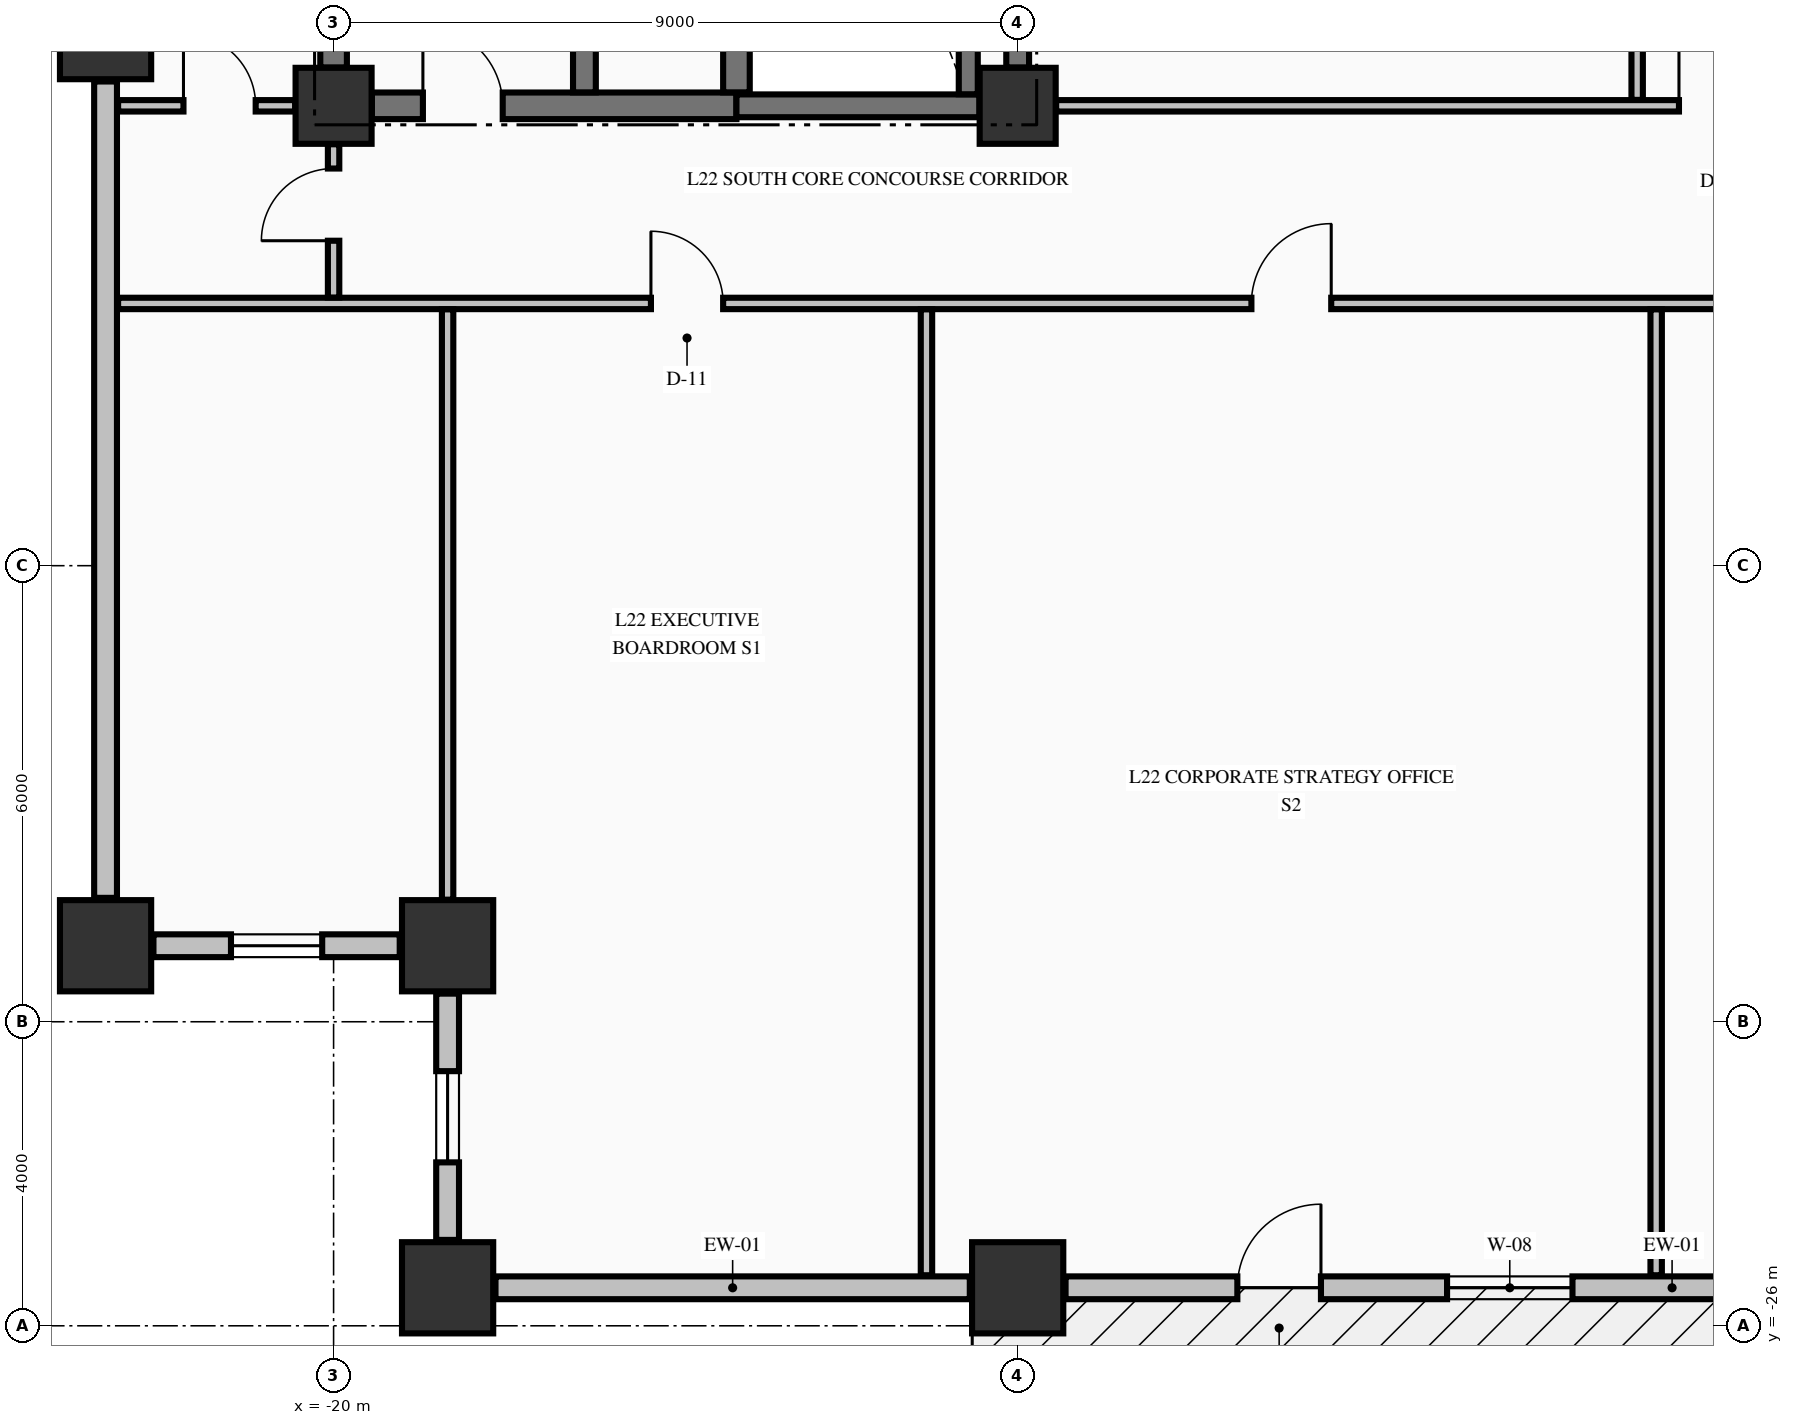
"""IFC4 building model, lengths in metres.
Left out: names, types, materials, properties, quantities, classifications, styles, units other than length and angle.
Written with IfcOpenShell. Run it as: python <this file> out.ifc"""

import sys

from ifc_helpers import new_model, si_unit, direction, frame, frame_2d, origin, origin_2d, place, context, subcontext, project, spatial, rectangle, extrude, element, fill, save


model = new_model("IFC4")
c1 = context("Model", 3, precision=1e-05, world=origin(), true_north=direction((0.0, 1.0)))
c2 = subcontext(c1, "Body", "Model", "MODEL_VIEW")
j1 = project(units=[si_unit("LENGTHUNIT", "METRE"), si_unit("PLANEANGLEUNIT", "RADIAN")], contexts=[c1])
p1 = place(None, origin())
s1 = spatial("IfcSite", under=j1, at=p1, CompositionType="ELEMENT")
p2 = place(p1, origin())
s2 = spatial("IfcBuilding", under=s1, at=p2, CompositionType="ELEMENT")
p3 = place(p2, frame((0.0, 0.0, 91.36)))
s3 = spatial("IfcBuildingStorey", under=s2, at=p3, CompositionType="ELEMENT", Elevation=91.36)
for number, where, z_axis, x_axis in (
    (1, (-18.5, -25.5, -0.25), (0.0, 0.0, 1.0), (1.0, 0.0, 0.0)),
    (2, (-11.0, -25.5, -0.25), (0.0, 0.0, 1.0), (1.0, 0.0, 0.0)),
    (3, (-23.0, -21.0, -0.25), (0.0, 0.0, 1.0), (1.0, 0.0, 0.0)),
    (4, (-23.0, -9.0, -0.25), (0.0, 0.0, 1.0), (1.0, 0.0, 0.0)),
    (5, (-18.5, -21.0, -0.25), (0.0, 0.0, 1.0), (1.0, 0.0, 0.0)),
):
    element("IfcColumn", number, at=place(p3, frame(where, z_axis=z_axis, x_axis=x_axis)), inside=s3, PredefinedType="COLUMN", context=c2, shape_type="SweptSolid", body=[
        extrude(rectangle(XDim=1.2, YDim=1.2, at=origin_2d()), origin(), (0.0, 0.0, 1.0), 3.57),
    ])
for number, where, z_axis, x_axis in (
    (6, (-20.0, -9.95, -0.25), (0.0, 0.0, 1.0), (1.0, 0.0, 0.0)),
    (7, (-11.0, -9.95, -0.25), (0.0, 0.0, 1.0), (1.0, 0.0, 0.0)),
):
    element("IfcColumn", number, at=place(p3, frame(where, z_axis=z_axis, x_axis=x_axis)), inside=s3, PredefinedType="COLUMN", context=c2, shape_type="SweptSolid", body=[
        extrude(rectangle(XDim=1.0, YDim=1.0, at=origin_2d()), origin(), (0.0, 0.0, 1.0), 3.57),
    ])
p4 = place(p3, frame((-22.37, -21.0, 0.0), z_axis=(0.0, 0.0, 1.0), x_axis=(1.0, 0.0, 0.0)))
e8 = element("IfcWall", 8, at=p4, inside=s3, PredefinedType="STANDARD", context=c2, shape_type="SweptSolid", body=[
    extrude(rectangle(XDim=3.24, YDim=0.3, at=frame_2d((1.62, 0.0))), origin(), (0.0, 0.0, 1.0), 2.712),
])
p5 = place(p4, frame((1.02, 0.0, 0.82)))
e9 = element("IfcOpeningElement", 9, at=p5, cuts=e8, PredefinedType="OPENING", context=c2, shape_type="SweptSolid", body=[
    extrude(rectangle(XDim=1.2, YDim=1.65, at=frame_2d((0.6, 0.825))), frame((0.0, 0.16, 0.0), z_axis=(0.0, -1.0, 0.0), x_axis=(1.0, 0.0, 0.0)), (0.0, 0.0, 1.0), 0.32),
])
p6 = place(p3, frame((-18.5, -21.63, 0.0), z_axis=(0.0, 0.0, 1.0), x_axis=(0.0, -1.0, 0.0)))
e10 = element("IfcWall", 10, at=p6, inside=s3, PredefinedType="STANDARD", context=c2, shape_type="SweptSolid", body=[
    extrude(rectangle(XDim=3.24, YDim=0.3, at=frame_2d((1.62, 0.0))), origin(), (0.0, 0.0, 1.0), 2.712),
])
p7 = place(p6, frame((1.02, 0.0, 0.82)))
e11 = element("IfcOpeningElement", 11, at=p7, cuts=e10, PredefinedType="OPENING", context=c2, shape_type="SweptSolid", body=[
    extrude(rectangle(XDim=1.2, YDim=1.65, at=frame_2d((0.6, 0.825))), frame((0.0, 0.16, 0.0), z_axis=(0.0, -1.0, 0.0), x_axis=(1.0, 0.0, 0.0)), (0.0, 0.0, 1.0), 0.32),
])
p8 = place(p3, frame((-17.87, -25.5, 0.0), z_axis=(0.0, 0.0, 1.0), x_axis=(1.0, 0.0, 0.0)))
e12 = element("IfcWall", 12, at=p8, inside=s3, PredefinedType="STANDARD", context=c2, shape_type="SweptSolid", body=[
    extrude(rectangle(XDim=6.24, YDim=0.3, at=frame_2d((3.12, 0.0))), origin(), (0.0, 0.0, 1.0), 2.712),
])
p9 = place(p3, frame((-10.37, -25.5, 0.0), z_axis=(0.0, 0.0, 1.0), x_axis=(1.0, 0.0, 0.0)))
e13 = element("IfcWall", 13, at=p9, inside=s3, PredefinedType="STANDARD", context=c2, shape_type="SweptSolid", body=[
    extrude(rectangle(XDim=9.74, YDim=0.3, at=frame_2d((4.87, 0.0))), origin(), (0.0, 0.0, 1.0), 2.712),
])
p10 = place(p9, frame((2.26, 0.0, 0.0)))
e14 = element("IfcOpeningElement", 14, at=p10, cuts=e13, PredefinedType="OPENING", context=c2, shape_type="SweptSolid", body=[
    extrude(rectangle(XDim=1.1, YDim=2.15, at=frame_2d((0.55, 1.075))), frame((0.0, 0.16, 0.0), z_axis=(0.0, -1.0, 0.0), x_axis=(1.0, 0.0, 0.0)), (0.0, 0.0, 1.0), 0.32),
])
p11 = place(p9, frame((5.019, 0.0, 0.8)))
e15 = element("IfcOpeningElement", 15, at=p11, cuts=e13, PredefinedType="OPENING", context=c2, shape_type="SweptSolid", body=[
    extrude(rectangle(XDim=1.65, YDim=1.7, at=frame_2d((0.825, 0.85))), frame((0.0, 0.16, 0.0), z_axis=(0.0, -1.0, 0.0), x_axis=(1.0, 0.0, 0.0)), (0.0, 0.0, 1.0), 0.32),
])
p12 = place(p3, frame((-23.0, -9.63, 0.0), z_axis=(0.0, 0.0, 1.0), x_axis=(0.0, -1.0, 0.0)))
e16 = element("IfcWall", 16, at=p12, inside=s3, PredefinedType="STANDARD", context=c2, shape_type="SweptSolid", body=[
    extrude(rectangle(XDim=10.74, YDim=0.3, at=frame_2d((5.37, 0.0))), origin(), (0.0, 0.0, 1.0), 2.712),
])
p13 = place(p3, frame((-19.496, -9.95, 0.0), z_axis=(0.0, 0.0, 1.0), x_axis=(1.0, 0.0, 0.0)))
e17 = element("IfcWall", 17, at=p13, inside=s3, PredefinedType="SHEAR", context=c2, shape_type="SweptSolid", body=[
    extrude(rectangle(XDim=4.796, YDim=0.35, at=frame_2d((2.398, 0.0))), origin(), (0.0, 0.0, 1.0), 3.32),
])
p14 = place(p13, frame((0.671, 0.0, 0.0)))
e18 = element("IfcOpeningElement", 18, at=p14, cuts=e17, PredefinedType="OPENING", context=c2, shape_type="SweptSolid", body=[
    extrude(rectangle(XDim=1.05, YDim=2.15, at=frame_2d((0.525, 1.075))), frame((0.0, 0.185, 0.0), z_axis=(0.0, -1.0, 0.0), x_axis=(1.0, 0.0, 0.0)), (0.0, 0.0, 1.0), 0.37),
])
p15 = place(p3, frame((-14.7, -9.95, 0.0), z_axis=(0.0, 0.0, 1.0), x_axis=(1.0, 0.0, 0.0)))
e19 = element("IfcWall", 19, at=p15, inside=s3, PredefinedType="SHEAR", context=c2, shape_type="SweptSolid", body=[
    extrude(rectangle(XDim=3.196, YDim=0.3, at=frame_2d((1.598, 0.0))), origin(), (0.0, 0.0, 1.0), 3.32),
])
p16 = place(p3, frame((-22.835, -12.55, 0.0), z_axis=(0.0, 0.0, 1.0), x_axis=(1.0, 0.0, 0.0)))
e20 = element("IfcWall", 20, at=p16, inside=s3, PredefinedType="PARTITIONING", context=c2, shape_type="SweptSolid", body=[
    extrude(rectangle(XDim=50.67, YDim=0.15, at=frame_2d((25.335, 0.0))), origin(), (0.0, 0.0, 1.0), 3.32),
])
p17 = place(p16, frame((7.01, 0.0, 0.0)))
e21 = element("IfcOpeningElement", 21, at=p17, cuts=e20, PredefinedType="OPENING", context=c2, shape_type="SweptSolid", body=[
    extrude(rectangle(XDim=0.95, YDim=2.15, at=frame_2d((0.475, 1.075))), frame((0.0, 0.085, 0.0), z_axis=(0.0, -1.0, 0.0), x_axis=(1.0, 0.0, 0.0)), (0.0, 0.0, 1.0), 0.17),
])
p18 = place(p16, frame((14.91, 0.0, 0.0)))
e22 = element("IfcOpeningElement", 22, at=p18, cuts=e20, PredefinedType="OPENING", context=c2, shape_type="SweptSolid", body=[
    extrude(rectangle(XDim=1.05, YDim=2.15, at=frame_2d((0.525, 1.075))), frame((0.0, 0.085, 0.0), z_axis=(0.0, -1.0, 0.0), x_axis=(1.0, 0.0, 0.0)), (0.0, 0.0, 1.0), 0.17),
])
p19 = place(p16, frame((24.71, 0.0, 0.0)))
e23 = element("IfcOpeningElement", 23, at=p19, cuts=e20, PredefinedType="OPENING", context=c2, shape_type="SweptSolid", body=[
    extrude(rectangle(XDim=1.05, YDim=2.15, at=frame_2d((0.525, 1.075))), frame((0.0, 0.085, 0.0), z_axis=(0.0, -1.0, 0.0), x_axis=(1.0, 0.0, 0.0)), (0.0, 0.0, 1.0), 0.17),
])
p20 = place(p16, frame((35.91, 0.0, 0.0)))
e24 = element("IfcOpeningElement", 24, at=p20, cuts=e20, PredefinedType="OPENING", context=c2, shape_type="SweptSolid", body=[
    extrude(rectangle(XDim=1.05, YDim=2.15, at=frame_2d((0.525, 1.075))), frame((0.0, 0.085, 0.0), z_axis=(0.0, -1.0, 0.0), x_axis=(1.0, 0.0, 0.0)), (0.0, 0.0, 1.0), 0.17),
])
p21 = place(p3, frame((-22.835, -9.95, 0.0), z_axis=(0.0, 0.0, 1.0), x_axis=(1.0, 0.0, 0.0)))
e25 = element("IfcWall", 25, at=p21, inside=s3, PredefinedType="PARTITIONING", context=c2, shape_type="SweptSolid", body=[
    extrude(rectangle(XDim=2.329, YDim=0.15, at=frame_2d((1.165, 0.0))), origin(), (0.0, 0.0, 1.0), 3.32),
])
p22 = place(p21, frame((0.86, 0.0, 0.0)))
e26 = element("IfcOpeningElement", 26, at=p22, cuts=e25, PredefinedType="OPENING", context=c2, shape_type="SweptSolid", body=[
    extrude(rectangle(XDim=0.95, YDim=2.15, at=frame_2d((0.475, 1.075))), frame((0.0, 0.085, 0.0), z_axis=(0.0, -1.0, 0.0), x_axis=(1.0, 0.0, 0.0)), (0.0, 0.0, 1.0), 0.17),
])
p23 = place(p3, frame((-10.494, -9.95, 0.0), z_axis=(0.0, 0.0, 1.0), x_axis=(1.0, 0.0, 0.0)))
e27 = element("IfcWall", 27, at=p23, inside=s3, PredefinedType="PARTITIONING", context=c2, shape_type="SweptSolid", body=[
    extrude(rectangle(XDim=20.988, YDim=0.15, at=frame_2d((10.494, 0.0))), origin(), (0.0, 0.0, 1.0), 3.32),
])
p24 = place(p23, frame((8.194, 0.0, 0.0)))
e28 = element("IfcOpeningElement", 28, at=p24, cuts=e27, PredefinedType="OPENING", context=c2, shape_type="SweptSolid", body=[
    extrude(rectangle(XDim=1.1, YDim=2.15, at=frame_2d((0.55, 1.075))), frame((0.0, 0.085, 0.0), z_axis=(0.0, -1.0, 0.0), x_axis=(1.0, 0.0, 0.0)), (0.0, 0.0, 1.0), 0.17),
])
p25 = place(p23, frame((13.619, 0.0, 0.0)))
e29 = element("IfcOpeningElement", 29, at=p25, cuts=e27, PredefinedType="OPENING", context=c2, shape_type="SweptSolid", body=[
    extrude(rectangle(XDim=0.95, YDim=2.15, at=frame_2d((0.475, 1.075))), frame((0.0, 0.085, 0.0), z_axis=(0.0, -1.0, 0.0), x_axis=(1.0, 0.0, 0.0)), (0.0, 0.0, 1.0), 0.17),
])
p26 = place(p23, frame((17.844, 0.0, 0.0)))
e30 = element("IfcOpeningElement", 30, at=p26, cuts=e27, PredefinedType="OPENING", context=c2, shape_type="SweptSolid", body=[
    extrude(rectangle(XDim=0.9, YDim=2.15, at=frame_2d((0.45, 1.075))), frame((0.0, 0.085, 0.0), z_axis=(0.0, -1.0, 0.0), x_axis=(1.0, 0.0, 0.0)), (0.0, 0.0, 1.0), 0.17),
])
p27 = place(p3, frame((-20.0, -9.446, 0.0), z_axis=(0.0, 0.0, 1.0), x_axis=(0.0, 1.0, 0.0)))
e31 = element("IfcWall", 31, at=p27, inside=s3, PredefinedType="SHEAR", context=c2, shape_type="SweptSolid", body=[
    extrude(rectangle(XDim=8.942, YDim=0.35, at=frame_2d((4.471, 0.0))), origin(), (0.0, 0.0, 1.0), 3.32),
])
p28 = place(p3, frame((-16.7, -9.773, 0.0), z_axis=(0.0, 0.0, 1.0), x_axis=(0.0, 1.0, 0.0)))
e32 = element("IfcWall", 32, at=p28, inside=s3, PredefinedType="SHEAR", context=c2, shape_type="SweptSolid", body=[
    extrude(rectangle(XDim=9.371, YDim=0.3, at=frame_2d((4.686, 0.0))), origin(), (0.0, 0.0, 1.0), 3.32),
])
p29 = place(p3, frame((-14.7, -9.773, 0.0), z_axis=(0.0, 0.0, 1.0), x_axis=(0.0, 1.0, 0.0)))
e33 = element("IfcWall", 33, at=p29, inside=s3, PredefinedType="SHEAR", context=c2, shape_type="SweptSolid", body=[
    extrude(rectangle(XDim=9.371, YDim=0.35, at=frame_2d((4.686, 0.0))), origin(), (0.0, 0.0, 1.0), 3.32),
])
p30 = place(p3, frame((-11.65, -9.798, 0.0), z_axis=(0.0, 0.0, 1.0), x_axis=(0.0, 1.0, 0.0)))
e34 = element("IfcWall", 34, at=p30, inside=s3, PredefinedType="SOLIDWALL", context=c2, shape_type="SweptSolid", body=[
    extrude(rectangle(XDim=9.396, YDim=0.25, at=frame_2d((4.698, 0.0))), origin(), (0.0, 0.0, 1.0), 3.32),
])
p31 = place(p3, frame((-11.0, -9.446, 0.0), z_axis=(0.0, 0.0, 1.0), x_axis=(0.0, 1.0, 0.0)))
e35 = element("IfcWall", 35, at=p31, inside=s3, PredefinedType="SHEAR", context=c2, shape_type="SweptSolid", body=[
    extrude(rectangle(XDim=8.942, YDim=0.3, at=frame_2d((4.471, 0.0))), origin(), (0.0, 0.0, 1.0), 3.32),
])
p32 = place(p3, frame((-20.0, -12.472, 0.0), z_axis=(0.0, 0.0, 1.0), x_axis=(0.0, 1.0, 0.0)))
e36 = element("IfcWall", 36, at=p32, inside=s3, PredefinedType="PARTITIONING", context=c2, shape_type="SweptSolid", body=[
    extrude(rectangle(XDim=2.016, YDim=0.15, at=frame_2d((1.008, 0.0))), origin(), (0.0, 0.0, 1.0), 2.81),
])
p33 = place(p32, frame((0.747, 0.0, 0.0)))
e37 = element("IfcOpeningElement", 37, at=p33, cuts=e36, PredefinedType="OPENING", context=c2, shape_type="SweptSolid", body=[
    extrude(rectangle(XDim=0.95, YDim=2.15, at=frame_2d((0.475, 1.075))), frame((0.0, 0.085, 0.0), z_axis=(0.0, -1.0, 0.0), x_axis=(1.0, 0.0, 0.0)), (0.0, 0.0, 1.0), 0.17),
])
p34 = place(p3, frame((-18.5, -20.394, 0.0), z_axis=(0.0, 0.0, 1.0), x_axis=(0.0, 1.0, 0.0)))
e38 = element("IfcWall", 38, at=p34, inside=s3, PredefinedType="PARTITIONING", context=c2, shape_type="SweptSolid", body=[
    extrude(rectangle(XDim=7.766, YDim=0.15, at=frame_2d((3.883, 0.0))), origin(), (0.0, 0.0, 1.0), 3.32),
])
p35 = place(p3, frame((-12.2, -25.335, 0.0), z_axis=(0.0, 0.0, 1.0), x_axis=(0.0, 1.0, 0.0)))
e39 = element("IfcWall", 39, at=p35, inside=s3, PredefinedType="PARTITIONING", context=c2, shape_type="SweptSolid", body=[
    extrude(rectangle(XDim=12.707, YDim=0.15, at=frame_2d((6.354, 0.0))), origin(), (0.0, 0.0, 1.0), 3.32),
])
p36 = place(p3, frame((-2.85, -9.872, 0.0), z_axis=(0.0, 0.0, 1.0), x_axis=(0.0, 1.0, 0.0)))
e40 = element("IfcWall", 40, at=p36, inside=s3, PredefinedType="PARTITIONING", context=c2, shape_type="SweptSolid", body=[
    extrude(rectangle(XDim=9.544, YDim=0.15, at=frame_2d((4.772, 0.0))), origin(), (0.0, 0.0, 1.0), 3.32),
])
p37 = place(p3, frame((-2.6, -25.335, 0.0), z_axis=(0.0, 0.0, 1.0), x_axis=(0.0, 1.0, 0.0)))
e41 = element("IfcWall", 41, at=p37, inside=s3, PredefinedType="PARTITIONING", context=c2, shape_type="SweptSolid", body=[
    extrude(rectangle(XDim=12.707, YDim=0.15, at=frame_2d((6.354, 0.0))), origin(), (0.0, 0.0, 1.0), 3.32),
])
p38 = place(p5, origin())
e42 = element("IfcWindow", 42, at=p38, inside=s3, PartitioningType="SINGLE_PANEL", PredefinedType="WINDOW", context=c2, shape_type="SweptSolid", body=[
    extrude(rectangle(XDim=1.2, YDim=1.65, at=frame_2d((0.6, 0.825))), frame((0.0, 0.03, 0.0), z_axis=(0.0, -1.0, 0.0), x_axis=(1.0, 0.0, 0.0)), (0.0, 0.0, 1.0), 0.06),
])
fill(e9, e42)
p39 = place(p7, origin())
e43 = element("IfcWindow", 43, at=p39, inside=s3, PartitioningType="SINGLE_PANEL", PredefinedType="WINDOW", context=c2, shape_type="SweptSolid", body=[
    extrude(rectangle(XDim=1.2, YDim=1.65, at=frame_2d((0.6, 0.825))), frame((0.0, 0.03, 0.0), z_axis=(0.0, -1.0, 0.0), x_axis=(1.0, 0.0, 0.0)), (0.0, 0.0, 1.0), 0.06),
])
fill(e11, e43)
p40 = place(p10, origin())
e44 = element("IfcDoor", 44, at=p40, inside=s3, OperationType="SINGLE_SWING_RIGHT", PredefinedType="DOOR", context=c2, shape_type="SweptSolid", body=[
    extrude(rectangle(XDim=1.1, YDim=2.15, at=frame_2d((0.55, 1.075))), frame((0.0, 0.025, 0.0), z_axis=(0.0, -1.0, 0.0), x_axis=(1.0, 0.0, 0.0)), (0.0, 0.0, 1.0), 0.05),
])
fill(e14, e44)
p41 = place(p11, origin())
e45 = element("IfcWindow", 45, at=p41, inside=s3, PartitioningType="SINGLE_PANEL", PredefinedType="WINDOW", context=c2, shape_type="SweptSolid", body=[
    extrude(rectangle(XDim=1.65, YDim=1.7, at=frame_2d((0.825, 0.85))), frame((0.0, 0.03, 0.0), z_axis=(0.0, -1.0, 0.0), x_axis=(1.0, 0.0, 0.0)), (0.0, 0.0, 1.0), 0.06),
])
fill(e15, e45)
p42 = place(p14, origin())
e46 = element("IfcDoor", 46, at=p42, inside=s3, OperationType="SINGLE_SWING_LEFT", PredefinedType="DOOR", context=c2, shape_type="SweptSolid", body=[
    extrude(rectangle(XDim=1.05, YDim=2.15, at=frame_2d((0.525, 1.075))), frame((0.0, 0.025, 0.0), z_axis=(0.0, -1.0, 0.0), x_axis=(1.0, 0.0, 0.0)), (0.0, 0.0, 1.0), 0.05),
])
fill(e18, e46)
p43 = place(p24, origin())
e47 = element("IfcDoor", 47, at=p43, inside=s3, OperationType="SINGLE_SWING_LEFT", PredefinedType="DOOR", context=c2, shape_type="SweptSolid", body=[
    extrude(rectangle(XDim=1.1, YDim=2.15, at=frame_2d((0.55, 1.075))), frame((0.0, 0.025, 0.0), z_axis=(0.0, -1.0, 0.0), x_axis=(1.0, 0.0, 0.0)), (0.0, 0.0, 1.0), 0.05),
])
fill(e28, e47)
p44 = place(p17, origin())
e48 = element("IfcDoor", 48, at=p44, inside=s3, OperationType="SINGLE_SWING_LEFT", PredefinedType="DOOR", context=c2, shape_type="SweptSolid", body=[
    extrude(rectangle(XDim=0.95, YDim=2.15, at=frame_2d((0.475, 1.075))), frame((0.0, 0.025, 0.0), z_axis=(0.0, -1.0, 0.0), x_axis=(1.0, 0.0, 0.0)), (0.0, 0.0, 1.0), 0.05),
])
fill(e21, e48)
p45 = place(p18, origin())
e49 = element("IfcDoor", 49, at=p45, inside=s3, OperationType="SINGLE_SWING_RIGHT", PredefinedType="DOOR", context=c2, shape_type="SweptSolid", body=[
    extrude(rectangle(XDim=1.05, YDim=2.15, at=frame_2d((0.525, 1.075))), frame((0.0, 0.025, 0.0), z_axis=(0.0, -1.0, 0.0), x_axis=(1.0, 0.0, 0.0)), (0.0, 0.0, 1.0), 0.05),
])
fill(e22, e49)
p46 = place(p33, origin())
e50 = element("IfcDoor", 50, at=p46, inside=s3, OperationType="SINGLE_SWING_LEFT", PredefinedType="DOOR", context=c2, shape_type="SweptSolid", body=[
    extrude(rectangle(XDim=0.95, YDim=2.15, at=frame_2d((0.475, 1.075))), frame((0.0, 0.025, 0.0), z_axis=(0.0, -1.0, 0.0), x_axis=(1.0, 0.0, 0.0)), (0.0, 0.0, 1.0), 0.05),
])
fill(e37, e50)
p47 = place(p22, origin())
e51 = element("IfcDoor", 51, at=p47, inside=s3, OperationType="SINGLE_SWING_LEFT", PredefinedType="DOOR", context=c2, shape_type="SweptSolid", body=[
    extrude(rectangle(XDim=0.95, YDim=2.15, at=frame_2d((0.475, 1.075))), frame((0.0, 0.025, 0.0), z_axis=(0.0, -1.0, 0.0), x_axis=(1.0, 0.0, 0.0)), (0.0, 0.0, 1.0), 0.05),
])
fill(e26, e51)
save(model, sys.argv[1])
